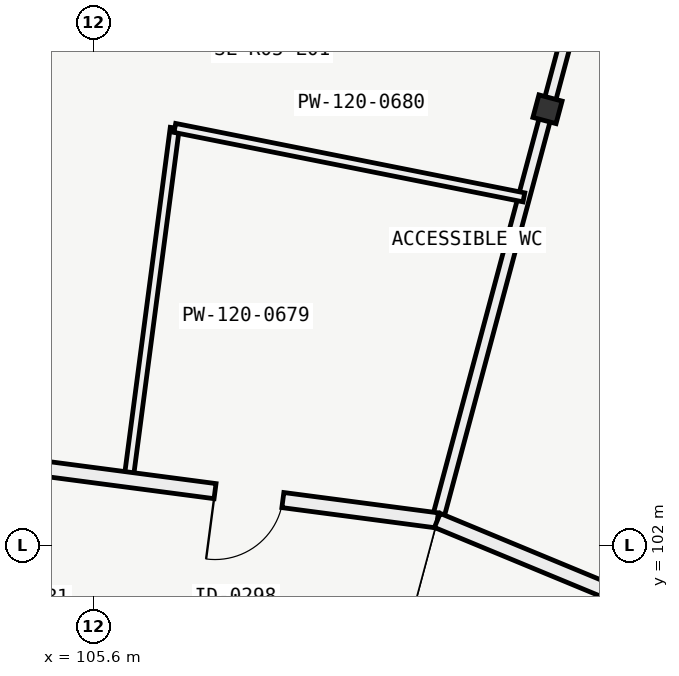
"""IFC4 building model, lengths in metres.
Left out: names, types, materials, properties, quantities, classifications, styles, units other than length and angle.
Written with IfcOpenShell. Run it as: python <this file> out.ifc"""

import sys

from ifc_helpers import new_model, si_unit, direction, frame, frame_2d, origin, origin_2d, place, context, subcontext, project, spatial, rectangle, i_section, extrude, element, fill, save


model = new_model("IFC4")
c1 = context("Model", 3, precision=1e-05, world=origin(), true_north=direction((0.0, 1.0)))
c2 = subcontext(c1, "Body", "Model", "MODEL_VIEW")
j1 = project(units=[si_unit("LENGTHUNIT", "METRE"), si_unit("PLANEANGLEUNIT", "RADIAN")], contexts=[c1])
p1 = place(None, origin())
s1 = spatial("IfcSite", under=j1, at=p1, CompositionType="ELEMENT")
p2 = place(p1, origin())
s2 = spatial("IfcBuilding", under=s1, at=p2, CompositionType="ELEMENT")
p3 = place(p2, frame((0.0, 0.0, 5.4)))
s3 = spatial("IfcBuildingStorey", under=s2, at=p3, CompositionType="ELEMENT", Elevation=5.4)
p4 = place(p3, frame((111.576, 107.739, 0.0), z_axis=(0.0, 0.0, 1.0), x_axis=(0.258819045103, 0.965925826289, 0.0)))
e1 = element("IfcColumn", 1, at=p4, inside=s3, PredefinedType="COLUMN", context=c2, shape_type="SweptSolid", body=[
    extrude(i_section(OverallWidth=0.307, OverallDepth=0.315, WebThickness=0.012, FlangeThickness=0.019, FilletRadius=0.017, at=origin_2d()), origin(), (0.0, 0.0, 1.0), 4.2),
])
p5 = place(p3, frame((110.127, 102.33, 0.0), z_axis=(0.0, 0.0, 1.0), x_axis=(0.258810530041, 0.965928107853, 0.0)))
e2 = element("IfcWall", 2, at=p5, inside=s3, PredefinedType="PARTITIONING", context=c2, shape_type="SweptSolid", body=[
    extrude(rectangle(XDim=14.48, YDim=0.15, at=frame_2d((7.24, 0.0))), origin(), (0.0, 0.0, 1.0), 3.367),
])
p6 = place(p3, frame((106.063, 102.865, 0.0), z_axis=(0.0, 0.0, 1.0), x_axis=(0.130526207551, 0.991444859356, 0.0)))
e3 = element("IfcWall", 3, at=p6, inside=s3, PredefinedType="PARTITIONING", context=c2, shape_type="SweptSolid", body=[
    extrude(rectangle(XDim=4.669, YDim=0.12, at=frame_2d((2.334, 0.0))), origin(), (0.0, 0.0, 1.0), 3.652),
])
p7 = place(p3, frame((111.266, 106.58, 0.0), z_axis=(0.0, 0.0, 1.0), x_axis=(-0.980784676414, 0.195093358449, 0.0)))
e4 = element("IfcWall", 4, at=p7, inside=s3, PredefinedType="PARTITIONING", context=c2, shape_type="SweptSolid", body=[
    extrude(rectangle(XDim=4.683, YDim=0.12, at=frame_2d((2.341, 0.0))), origin(), (0.0, 0.0, 1.0), 3.372),
])
p8 = place(p3, frame((110.127, 102.33, 0.0), z_axis=(0.0, 0.0, 1.0), x_axis=(-0.991446589332, 0.130513066404, 0.0)))
e5 = element("IfcWall", 5, at=p8, inside=s3, PredefinedType="PARTITIONING", context=c2, shape_type="SweptSolid", body=[
    extrude(rectangle(XDim=8.197, YDim=0.2, at=frame_2d((4.099, 0.0))), origin(), (0.0, 0.0, 1.0), 3.372),
])
p9 = place(p8, frame((2.05, 0.0, 0.0)))
e6 = element("IfcOpeningElement", 6, at=p9, cuts=e5, PredefinedType="OPENING", context=c2, shape_type="SweptSolid", body=[
    extrude(rectangle(XDim=0.9, YDim=2.05, at=frame_2d((0.45, 1.025))), frame((0.0, 0.11, 0.0), z_axis=(0.0, -1.0, 0.0), x_axis=(1.0, 0.0, 0.0)), (0.0, 0.0, 1.0), 0.22),
])
p10 = place(p8, frame((6.15, 0.0, 0.0)))
e7 = element("IfcOpeningElement", 7, at=p10, cuts=e5, PredefinedType="OPENING", context=c2, shape_type="SweptSolid", body=[
    extrude(rectangle(XDim=1.4, YDim=2.2, at=frame_2d((0.7, 1.1))), frame((0.0, 0.11, 0.0), z_axis=(0.0, -1.0, 0.0), x_axis=(1.0, 0.0, 0.0)), (0.0, 0.0, 1.0), 0.22),
])
p11 = place(p3, frame((117.7, 99.193, 0.0), z_axis=(0.0, 0.0, 1.0), x_axis=(-0.923874167149, 0.382696385238, 0.0)))
e8 = element("IfcWall", 8, at=p11, inside=s3, PredefinedType="PARTITIONING", context=c2, shape_type="SweptSolid", body=[
    extrude(rectangle(XDim=8.197, YDim=0.2, at=frame_2d((4.099, 0.0))), origin(), (0.0, 0.0, 1.0), 3.372),
])
p12 = place(p9, origin())
e9 = element("IfcDoor", 9, at=p12, inside=s3, OperationType="SINGLE_SWING_RIGHT", PredefinedType="DOOR", context=c2, shape_type="SweptSolid", body=[
    extrude(rectangle(XDim=0.9, YDim=2.05, at=frame_2d((0.45, 1.025))), frame((0.0, 0.025, 0.0), z_axis=(0.0, -1.0, 0.0), x_axis=(1.0, 0.0, 0.0)), (0.0, 0.0, 1.0), 0.05),
])
fill(e6, e9)
save(model, sys.argv[1])
